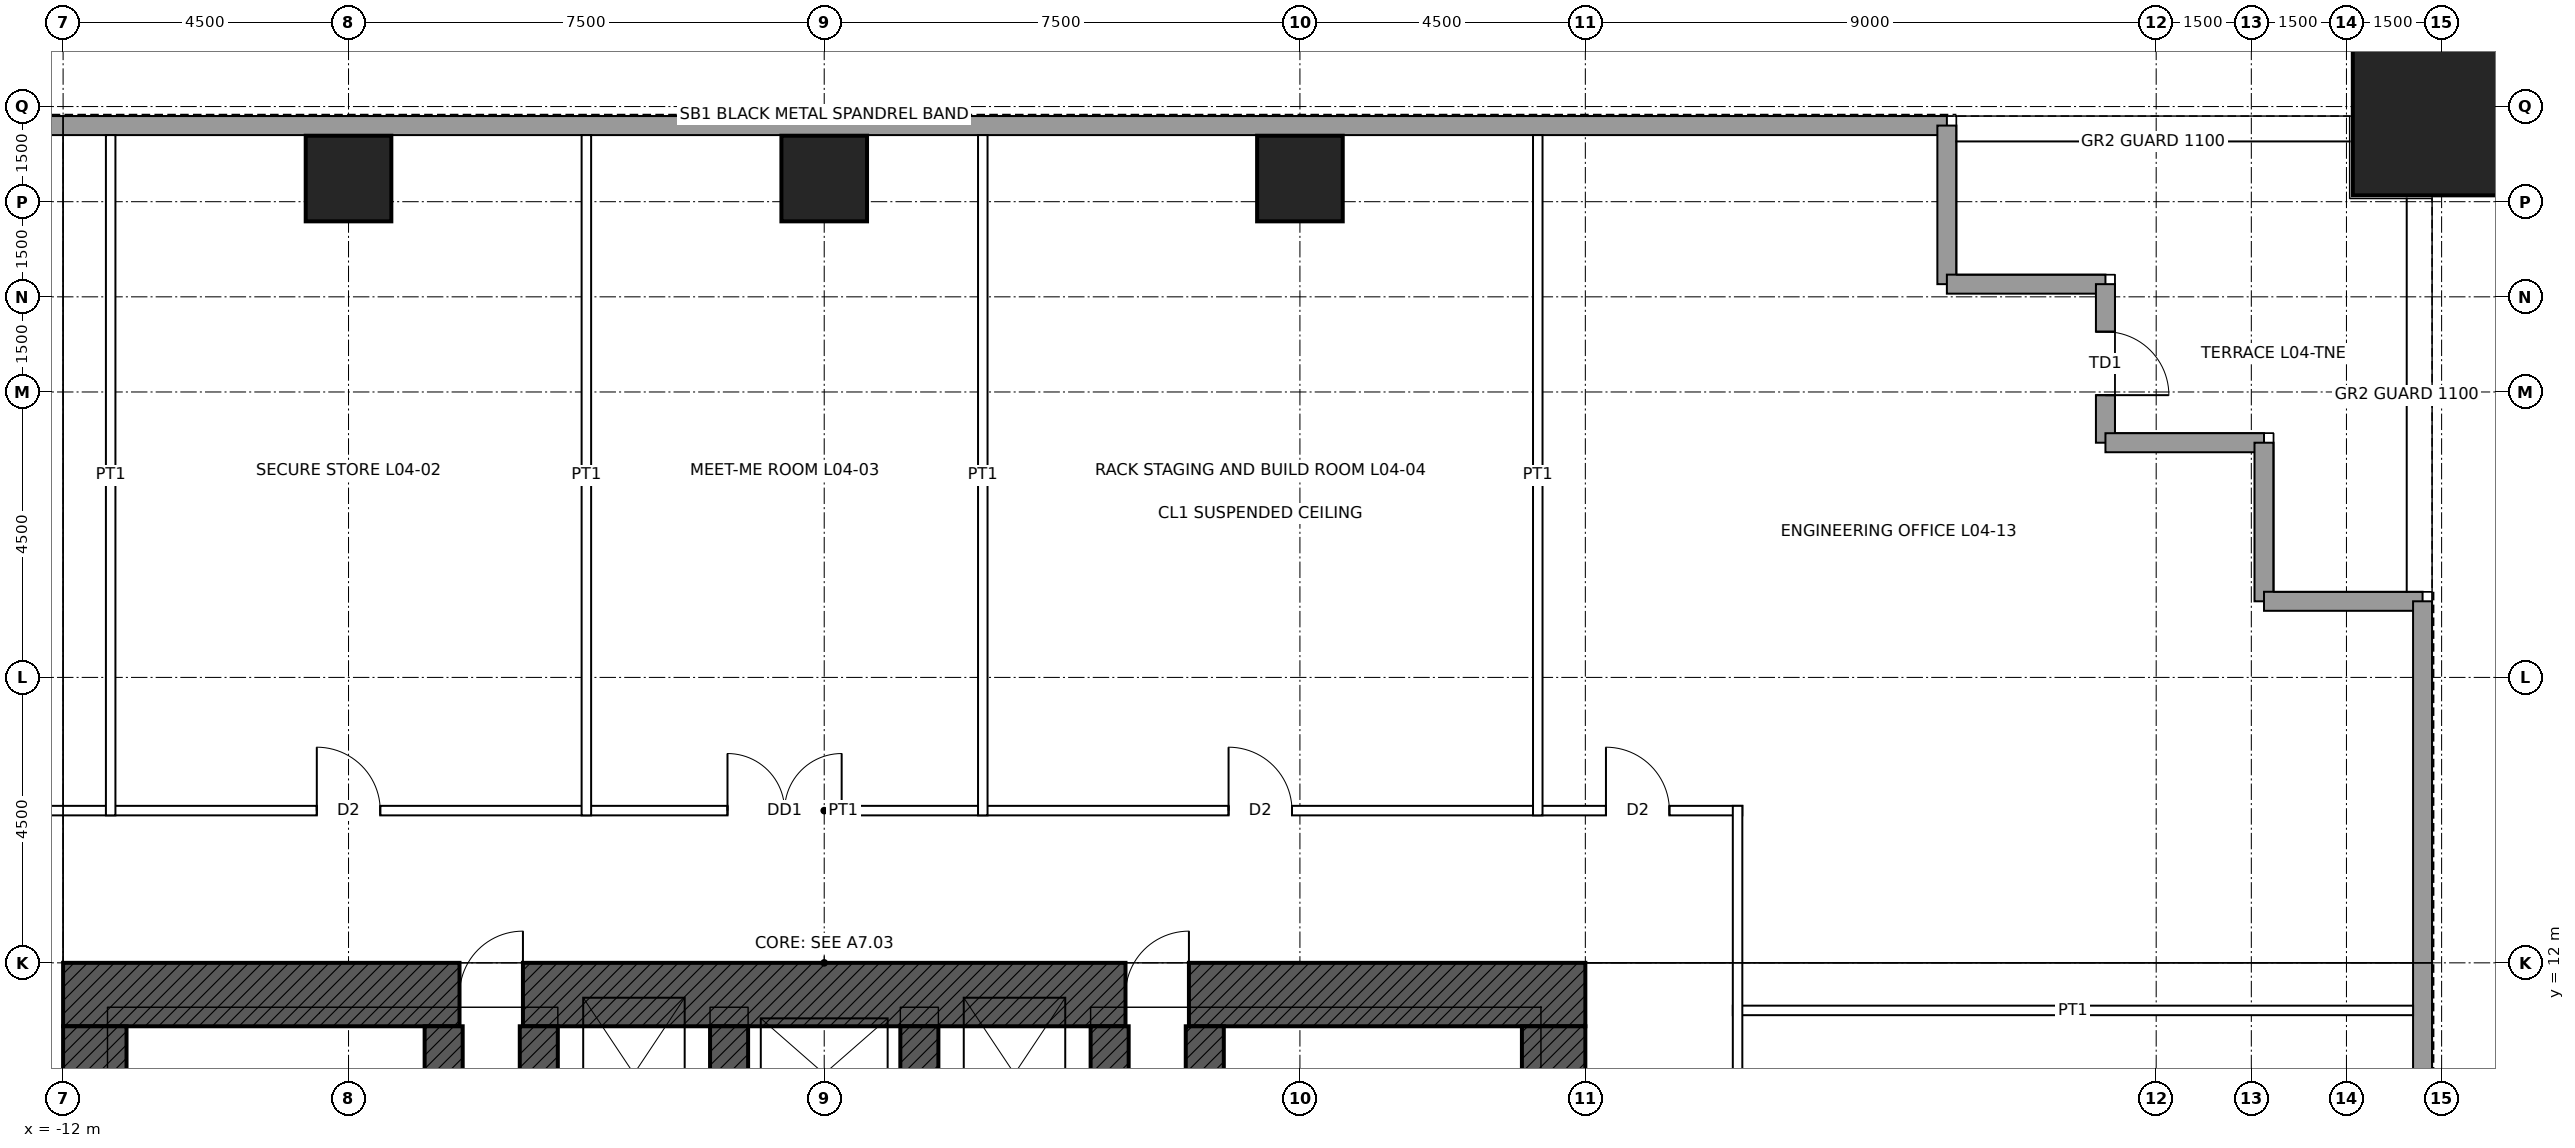
"""IFC4 building model, lengths in metres.
Left out: names, types, materials, properties, quantities, classifications, styles, units other than length and angle.
Written with IfcOpenShell. Run it as: python <this file> out.ifc"""

import sys

from ifc_helpers import new_model, si_unit, direction, frame, frame_2d, origin, origin_2d, place, context, subcontext, project, spatial, rectangle, hollow_rectangle, extrude, element, fill, save


model = new_model("IFC4")
c1 = context("Model", 3, precision=1e-05, world=origin(), true_north=direction((0.0, 1.0)))
c2 = subcontext(c1, "Body", "Model", "MODEL_VIEW")
j1 = project(units=[si_unit("LENGTHUNIT", "METRE"), si_unit("PLANEANGLEUNIT", "RADIAN")], contexts=[c1])
p1 = place(None, origin())
s1 = spatial("IfcSite", under=j1, at=p1, CompositionType="ELEMENT")
p2 = place(p1, origin())
s2 = spatial("IfcBuilding", under=s1, at=p2, CompositionType="ELEMENT")
p3 = place(p2, frame((0.0, 0.0, 23.4)))
s3 = spatial("IfcBuildingStorey", under=s2, at=p3, CompositionType="ELEMENT", Elevation=23.4)
p4 = place(p3, frame((25.5, 25.5, 0.0), z_axis=(0.0, 0.0, 1.0), x_axis=(1.0, 0.0, 0.0)))
e1 = element("IfcColumn", 1, at=p4, inside=s3, PredefinedType="COLUMN", context=c2, shape_type="SweptSolid", body=[
    extrude(hollow_rectangle(XDim=2.8, YDim=2.8, WallThickness=0.14, at=origin_2d()), origin(), (0.0, 0.0, 1.0), 5.0),
])
for number, where, z_axis, x_axis in (
    (2, (-7.5, 24.365, 0.0), (0.0, 0.0, 1.0), (1.0, 0.0, 0.0)),
    (3, (0.0, 24.365, 0.0), (0.0, 0.0, 1.0), (1.0, 0.0, 0.0)),
    (4, (7.5, 24.365, 0.0), (0.0, 0.0, 1.0), (1.0, 0.0, 0.0)),
):
    element("IfcColumn", number, at=place(p3, frame(where, z_axis=z_axis, x_axis=x_axis)), inside=s3, PredefinedType="COLUMN", context=c2, shape_type="SweptSolid", body=[
        extrude(hollow_rectangle(XDim=1.35, YDim=1.35, WallThickness=0.085, at=origin_2d()), origin(), (0.0, 0.0, 1.0), 5.0),
    ])
p5 = place(p3, frame((-12.0, 11.5, 0.0), z_axis=(0.0, 0.0, 1.0), x_axis=(1.0, 0.0, 0.0)))
e5 = element("IfcWall", 5, at=p5, inside=s3, PredefinedType="SHEAR", context=c2, shape_type="SweptSolid", body=[
    extrude(rectangle(XDim=24.0, YDim=1.0, at=frame_2d((12.0, 0.0))), origin(), (0.0, 0.0, 1.0), 5.0),
])
p6 = place(p5, frame((6.25, 0.0, 0.0)))
e6 = element("IfcOpeningElement", 6, at=p6, cuts=e5, PredefinedType="OPENING", context=c2, shape_type="SweptSolid", body=[
    extrude(rectangle(XDim=1.0, YDim=2.4, at=frame_2d((0.5, 1.2))), frame((0.0, 0.51, 0.0), z_axis=(0.0, -1.0, 0.0), x_axis=(1.0, 0.0, 0.0)), (0.0, 0.0, 1.0), 1.02),
])
p7 = place(p5, frame((16.75, 0.0, 0.0)))
e7 = element("IfcOpeningElement", 7, at=p7, cuts=e5, PredefinedType="OPENING", context=c2, shape_type="SweptSolid", body=[
    extrude(rectangle(XDim=1.0, YDim=2.4, at=frame_2d((0.5, 1.2))), frame((0.0, 0.51, 0.0), z_axis=(0.0, -1.0, 0.0), x_axis=(1.0, 0.0, 0.0)), (0.0, 0.0, 1.0), 1.02),
])
p8 = place(p3, frame((11.5, 11.0, 0.0), z_axis=(0.0, 0.0, 1.0), x_axis=(0.0, -1.0, 0.0)))
e8 = element("IfcWall", 8, at=p8, inside=s3, PredefinedType="SHEAR", context=c2, shape_type="SweptSolid", body=[
    extrude(rectangle(XDim=22.0, YDim=1.0, at=frame_2d((11.0, 0.0))), origin(), (0.0, 0.0, 1.0), 5.0),
])
p9 = place(p8, frame((10.5, 0.0, 0.0)))
e9 = element("IfcOpeningElement", 9, at=p9, cuts=e8, PredefinedType="OPENING", context=c2, shape_type="SweptSolid", body=[
    extrude(rectangle(XDim=1.0, YDim=2.4, at=frame_2d((0.5, 1.2))), frame((0.0, 0.51, 0.0), z_axis=(0.0, -1.0, 0.0), x_axis=(1.0, 0.0, 0.0)), (0.0, 0.0, 1.0), 1.02),
])
p10 = place(p3, frame((-11.5, -11.0, 0.0), z_axis=(0.0, 0.0, 1.0), x_axis=(0.0, 1.0, 0.0)))
e10 = element("IfcWall", 10, at=p10, inside=s3, PredefinedType="SHEAR", context=c2, shape_type="SweptSolid", body=[
    extrude(rectangle(XDim=22.0, YDim=1.0, at=frame_2d((11.0, 0.0))), origin(), (0.0, 0.0, 1.0), 5.0),
])
p11 = place(p10, frame((10.5, 0.0, 0.0)))
e11 = element("IfcOpeningElement", 11, at=p11, cuts=e10, PredefinedType="OPENING", context=c2, shape_type="SweptSolid", body=[
    extrude(rectangle(XDim=1.0, YDim=2.4, at=frame_2d((0.5, 1.2))), frame((0.0, 0.51, 0.0), z_axis=(0.0, -1.0, 0.0), x_axis=(1.0, 0.0, 0.0)), (0.0, 0.0, 1.0), 1.02),
])
p12 = place(p3, frame((-6.0, 4.5, 0.0), z_axis=(0.0, 0.0, 1.0), x_axis=(0.0, 1.0, 0.0)))
e12 = element("IfcWall", 12, at=p12, inside=s3, PredefinedType="SHEAR", context=c2, shape_type="SweptSolid", body=[
    extrude(rectangle(XDim=6.5, YDim=0.6, at=frame_2d((3.25, 0.0))), origin(), (0.0, 0.0, 1.0), 5.0),
])
p13 = place(p12, frame((0.6, 0.0, 0.0)))
e13 = element("IfcOpeningElement", 13, at=p13, cuts=e12, PredefinedType="OPENING", context=c2, shape_type="SweptSolid", body=[
    extrude(rectangle(XDim=1.0, YDim=2.1, at=frame_2d((0.5, 1.05))), frame((0.0, 0.31, 0.0), z_axis=(0.0, -1.0, 0.0), x_axis=(1.0, 0.0, 0.0)), (0.0, 0.0, 1.0), 0.62),
])
p14 = place(p3, frame((6.0, 4.5, 0.0), z_axis=(0.0, 0.0, 1.0), x_axis=(0.0, 1.0, 0.0)))
e14 = element("IfcWall", 14, at=p14, inside=s3, PredefinedType="SHEAR", context=c2, shape_type="SweptSolid", body=[
    extrude(rectangle(XDim=6.5, YDim=0.6, at=frame_2d((3.25, 0.0))), origin(), (0.0, 0.0, 1.0), 5.0),
])
p15 = place(p14, frame((0.6, 0.0, 0.0)))
e15 = element("IfcOpeningElement", 15, at=p15, cuts=e14, PredefinedType="OPENING", context=c2, shape_type="SweptSolid", body=[
    extrude(rectangle(XDim=1.0, YDim=2.1, at=frame_2d((0.5, 1.05))), frame((0.0, 0.31, 0.0), z_axis=(0.0, -1.0, 0.0), x_axis=(1.0, 0.0, 0.0)), (0.0, 0.0, 1.0), 0.62),
])
for number, where, z_axis, x_axis in (
    (16, (-4.5, 8.5, 0.0), (0.0, 0.0, 1.0), (0.0, 1.0, 0.0)),
    (17, (4.5, 8.5, 0.0), (0.0, 0.0, 1.0), (0.0, 1.0, 0.0)),
    (18, (-1.5, 8.5, 0.0), (0.0, 0.0, 1.0), (0.0, 1.0, 0.0)),
    (19, (1.5, 8.5, 0.0), (0.0, 0.0, 1.0), (0.0, 1.0, 0.0)),
):
    element("IfcWall", number, at=place(p3, frame(where, z_axis=z_axis, x_axis=x_axis)), inside=s3, PredefinedType="SHEAR", context=c2, shape_type="SweptSolid", body=[
        extrude(rectangle(XDim=2.5, YDim=0.6, at=frame_2d((1.25, 0.0))), origin(), (0.0, 0.0, 1.0), 5.0),
    ])
p16 = place(p3, frame((-17.7, 25.2, 0.0), z_axis=(0.0, 0.0, 1.0), x_axis=(1.0, 0.0, 0.0)))
e20 = element("IfcWall", 20, at=p16, inside=s3, PredefinedType="SOLIDWALL", context=c2, shape_type="SweptSolid", body=[
    extrude(rectangle(XDim=35.4, YDim=0.3, at=frame_2d((17.7, 0.0))), origin(), (0.0, 0.0, 1.0), 4.8),
])
for number, where, z_axis, x_axis in (
    (21, (17.7, 25.2, 0.0), (0.0, 0.0, 1.0), (0.0, -1.0, 0.0)),
    (22, (17.7, 22.7, 0.0), (0.0, 0.0, 1.0), (1.0, 0.0, 0.0)),
):
    element("IfcWall", number, at=place(p3, frame(where, z_axis=z_axis, x_axis=x_axis)), inside=s3, PredefinedType="SOLIDWALL", context=c2, shape_type="SweptSolid", body=[
        extrude(rectangle(XDim=2.5, YDim=0.3, at=frame_2d((1.25, 0.0))), origin(), (0.0, 0.0, 1.0), 4.8),
    ])
p17 = place(p3, frame((20.2, 22.7, 0.0), z_axis=(0.0, 0.0, 1.0), x_axis=(0.0, -1.0, 0.0)))
e23 = element("IfcWall", 23, at=p17, inside=s3, PredefinedType="SOLIDWALL", context=c2, shape_type="SweptSolid", body=[
    extrude(rectangle(XDim=2.5, YDim=0.3, at=frame_2d((1.25, 0.0))), origin(), (0.0, 0.0, 1.0), 4.8),
])
p18 = place(p17, frame((0.75, 0.0, 0.0)))
e24 = element("IfcOpeningElement", 24, at=p18, cuts=e23, PredefinedType="OPENING", context=c2, shape_type="SweptSolid", body=[
    extrude(rectangle(XDim=1.0, YDim=2.4, at=frame_2d((0.5, 1.2))), frame((0.0, 0.16, 0.0), z_axis=(0.0, -1.0, 0.0), x_axis=(1.0, 0.0, 0.0)), (0.0, 0.0, 1.0), 0.32),
])
for number, where, z_axis, x_axis in (
    (25, (20.2, 20.2, 0.0), (0.0, 0.0, 1.0), (1.0, 0.0, 0.0)),
    (26, (22.7, 20.2, 0.0), (0.0, 0.0, 1.0), (0.0, -1.0, 0.0)),
    (27, (22.7, 17.7, 0.0), (0.0, 0.0, 1.0), (1.0, 0.0, 0.0)),
):
    element("IfcWall", number, at=place(p3, frame(where, z_axis=z_axis, x_axis=x_axis)), inside=s3, PredefinedType="SOLIDWALL", context=c2, shape_type="SweptSolid", body=[
        extrude(rectangle(XDim=2.5, YDim=0.3, at=frame_2d((1.25, 0.0))), origin(), (0.0, 0.0, 1.0), 4.8),
    ])
p19 = place(p3, frame((25.2, 17.7, 0.0), z_axis=(0.0, 0.0, 1.0), x_axis=(0.0, -1.0, 0.0)))
e28 = element("IfcWall", 28, at=p19, inside=s3, PredefinedType="SOLIDWALL", context=c2, shape_type="SweptSolid", body=[
    extrude(rectangle(XDim=35.4, YDim=0.3, at=frame_2d((17.7, 0.0))), origin(), (0.0, 0.0, 1.0), 4.8),
])
p20 = place(p3, frame((14.325, 11.25, 0.0), z_axis=(0.0, 0.0, 1.0), x_axis=(1.0, 0.0, 0.0)))
e29 = element("IfcWall", 29, at=p20, inside=s3, PredefinedType="PARTITIONING", context=c2, shape_type="SweptSolid", body=[
    extrude(rectangle(XDim=10.725, YDim=0.15, at=frame_2d((5.363, 0.0))), origin(), (0.0, 0.0, 1.0), 3.853),
])
p21 = place(p3, frame((-14.475, 14.4, 0.0), z_axis=(0.0, 0.0, 1.0), x_axis=(1.0, 0.0, 0.0)))
e30 = element("IfcWall", 30, at=p21, inside=s3, PredefinedType="PARTITIONING", context=c2, shape_type="SweptSolid", body=[
    extrude(rectangle(XDim=28.95, YDim=0.15, at=frame_2d((14.475, 0.0))), origin(), (0.0, 0.0, 1.0), 4.8),
])
p22 = place(p21, frame((6.475, 0.0, 0.0)))
e31 = element("IfcOpeningElement", 31, at=p22, cuts=e30, PredefinedType="OPENING", context=c2, shape_type="SweptSolid", body=[
    extrude(rectangle(XDim=1.0, YDim=2.1, at=frame_2d((0.5, 1.05))), frame((0.0, 0.085, 0.0), z_axis=(0.0, -1.0, 0.0), x_axis=(1.0, 0.0, 0.0)), (0.0, 0.0, 1.0), 0.17),
])
p23 = place(p21, frame((12.95, 0.0, 0.0)))
e32 = element("IfcOpeningElement", 32, at=p23, cuts=e30, PredefinedType="OPENING", context=c2, shape_type="SweptSolid", body=[
    extrude(rectangle(XDim=1.8, YDim=2.4, at=frame_2d((0.9, 1.2))), frame((0.0, 0.085, 0.0), z_axis=(0.0, -1.0, 0.0), x_axis=(1.0, 0.0, 0.0)), (0.0, 0.0, 1.0), 0.17),
])
p24 = place(p21, frame((20.85, 0.0, 0.0)))
e33 = element("IfcOpeningElement", 33, at=p24, cuts=e30, PredefinedType="OPENING", context=c2, shape_type="SweptSolid", body=[
    extrude(rectangle(XDim=1.0, YDim=2.1, at=frame_2d((0.5, 1.05))), frame((0.0, 0.085, 0.0), z_axis=(0.0, -1.0, 0.0), x_axis=(1.0, 0.0, 0.0)), (0.0, 0.0, 1.0), 0.17),
])
p25 = place(p21, frame((26.8, 0.0, 0.0)))
e34 = element("IfcOpeningElement", 34, at=p25, cuts=e30, PredefinedType="OPENING", context=c2, shape_type="SweptSolid", body=[
    extrude(rectangle(XDim=1.0, YDim=2.1, at=frame_2d((0.5, 1.05))), frame((0.0, 0.085, 0.0), z_axis=(0.0, -1.0, 0.0), x_axis=(1.0, 0.0, 0.0)), (0.0, 0.0, 1.0), 0.17),
])
p26 = place(p21, frame((1.15, 0.0, 0.0)))
e35 = element("IfcOpeningElement", 35, at=p26, cuts=e30, PredefinedType="OPENING", context=c2, shape_type="SweptSolid", body=[
    extrude(rectangle(XDim=1.0, YDim=2.1, at=frame_2d((0.5, 1.05))), frame((0.0, 0.085, 0.0), z_axis=(0.0, -1.0, 0.0), x_axis=(1.0, 0.0, 0.0)), (0.0, 0.0, 1.0), 0.17),
])
for number, where, z_axis, x_axis in (
    (36, (-11.25, 14.325, 0.0), (0.0, 0.0, 1.0), (0.0, 1.0, 0.0)),
    (37, (-3.75, 14.325, 0.0), (0.0, 0.0, 1.0), (0.0, 1.0, 0.0)),
):
    element("IfcWall", number, at=place(p3, frame(where, z_axis=z_axis, x_axis=x_axis)), inside=s3, PredefinedType="PARTITIONING", context=c2, shape_type="SweptSolid", body=[
        extrude(rectangle(XDim=10.725, YDim=0.15, at=frame_2d((5.363, 0.0))), origin(), (0.0, 0.0, 1.0), 3.853),
    ])
p27 = place(p3, frame((2.5, 14.325, 0.0), z_axis=(0.0, 0.0, 1.0), x_axis=(0.0, 1.0, 0.0)))
e38 = element("IfcWall", 38, at=p27, inside=s3, PredefinedType="PARTITIONING", context=c2, shape_type="SweptSolid", body=[
    extrude(rectangle(XDim=10.725, YDim=0.15, at=frame_2d((5.363, 0.0))), origin(), (0.0, 0.0, 1.0), 4.8),
])
p28 = place(p3, frame((11.25, 14.325, 0.0), z_axis=(0.0, 0.0, 1.0), x_axis=(0.0, 1.0, 0.0)))
e39 = element("IfcWall", 39, at=p28, inside=s3, PredefinedType="PARTITIONING", context=c2, shape_type="SweptSolid", body=[
    extrude(rectangle(XDim=10.725, YDim=0.15, at=frame_2d((5.363, 0.0))), origin(), (0.0, 0.0, 1.0), 3.853),
])
p29 = place(p3, frame((14.4, -14.475, 0.0), z_axis=(0.0, 0.0, 1.0), x_axis=(0.0, 1.0, 0.0)))
e40 = element("IfcWall", 40, at=p29, inside=s3, PredefinedType="PARTITIONING", context=c2, shape_type="SweptSolid", body=[
    extrude(rectangle(XDim=28.95, YDim=0.15, at=frame_2d((14.475, 0.0))), origin(), (0.0, 0.0, 1.0), 4.8),
])
p30 = place(p29, frame((23.35, 0.0, 0.0)))
e41 = element("IfcOpeningElement", 41, at=p30, cuts=e40, PredefinedType="OPENING", context=c2, shape_type="SweptSolid", body=[
    extrude(rectangle(XDim=1.0, YDim=2.1, at=frame_2d((0.5, 1.05))), frame((0.0, 0.085, 0.0), z_axis=(0.0, -1.0, 0.0), x_axis=(1.0, 0.0, 0.0)), (0.0, 0.0, 1.0), 0.17),
])
p31 = place(p29, frame((11.7, 0.0, 0.0)))
e42 = element("IfcOpeningElement", 42, at=p31, cuts=e40, PredefinedType="OPENING", context=c2, shape_type="SweptSolid", body=[
    extrude(rectangle(XDim=1.8, YDim=2.4, at=frame_2d((0.9, 1.2))), frame((0.0, 0.085, 0.0), z_axis=(0.0, -1.0, 0.0), x_axis=(1.0, 0.0, 0.0)), (0.0, 0.0, 1.0), 0.17),
])
p32 = place(p18, origin())
e43 = element("IfcDoor", 43, at=p32, inside=s3, OperationType="SINGLE_SWING_RIGHT", PredefinedType="DOOR", context=c2, shape_type="SweptSolid", body=[
    extrude(rectangle(XDim=1.0, YDim=2.4, at=frame_2d((0.5, 1.2))), frame((0.0, 0.025, 0.0), z_axis=(0.0, -1.0, 0.0), x_axis=(1.0, 0.0, 0.0)), (0.0, 0.0, 1.0), 0.05),
])
fill(e24, e43)
p33 = place(p6, origin())
e44 = element("IfcDoor", 44, at=p33, inside=s3, OperationType="SINGLE_SWING_RIGHT", PredefinedType="DOOR", context=c2, shape_type="SweptSolid", body=[
    extrude(rectangle(XDim=1.0, YDim=2.4, at=frame_2d((0.5, 1.2))), frame((0.0, 0.485, 0.0), z_axis=(0.0, -1.0, 0.0), x_axis=(1.0, 0.0, 0.0)), (0.0, 0.0, 1.0), 0.05),
])
fill(e6, e44)
p34 = place(p7, origin())
e45 = element("IfcDoor", 45, at=p34, inside=s3, OperationType="SINGLE_SWING_RIGHT", PredefinedType="DOOR", context=c2, shape_type="SweptSolid", body=[
    extrude(rectangle(XDim=1.0, YDim=2.4, at=frame_2d((0.5, 1.2))), frame((0.0, 0.485, 0.0), z_axis=(0.0, -1.0, 0.0), x_axis=(1.0, 0.0, 0.0)), (0.0, 0.0, 1.0), 0.05),
])
fill(e7, e45)
p35 = place(p22, origin())
e46 = element("IfcDoor", 46, at=p35, inside=s3, OperationType="SINGLE_SWING_LEFT", PredefinedType="DOOR", context=c2, shape_type="SweptSolid", body=[
    extrude(rectangle(XDim=1.0, YDim=2.1, at=frame_2d((0.5, 1.05))), frame((0.0, 0.025, 0.0), z_axis=(0.0, -1.0, 0.0), x_axis=(1.0, 0.0, 0.0)), (0.0, 0.0, 1.0), 0.05),
])
fill(e31, e46)
p36 = place(p23, origin())
e47 = element("IfcDoor", 47, at=p36, inside=s3, OperationType="DOUBLE_DOOR_SINGLE_SWING", PredefinedType="DOOR", context=c2, shape_type="SweptSolid", body=[
    extrude(rectangle(XDim=1.8, YDim=2.4, at=frame_2d((0.9, 1.2))), frame((0.0, 0.025, 0.0), z_axis=(0.0, -1.0, 0.0), x_axis=(1.0, 0.0, 0.0)), (0.0, 0.0, 1.0), 0.05),
])
fill(e32, e47)
p37 = place(p24, origin())
e48 = element("IfcDoor", 48, at=p37, inside=s3, OperationType="SINGLE_SWING_LEFT", PredefinedType="DOOR", context=c2, shape_type="SweptSolid", body=[
    extrude(rectangle(XDim=1.0, YDim=2.1, at=frame_2d((0.5, 1.05))), frame((0.0, 0.025, 0.0), z_axis=(0.0, -1.0, 0.0), x_axis=(1.0, 0.0, 0.0)), (0.0, 0.0, 1.0), 0.05),
])
fill(e33, e48)
p38 = place(p25, origin())
e49 = element("IfcDoor", 49, at=p38, inside=s3, OperationType="SINGLE_SWING_LEFT", PredefinedType="DOOR", context=c2, shape_type="SweptSolid", body=[
    extrude(rectangle(XDim=1.0, YDim=2.1, at=frame_2d((0.5, 1.05))), frame((0.0, 0.025, 0.0), z_axis=(0.0, -1.0, 0.0), x_axis=(1.0, 0.0, 0.0)), (0.0, 0.0, 1.0), 0.05),
])
fill(e34, e49)
save(model, sys.argv[1])
